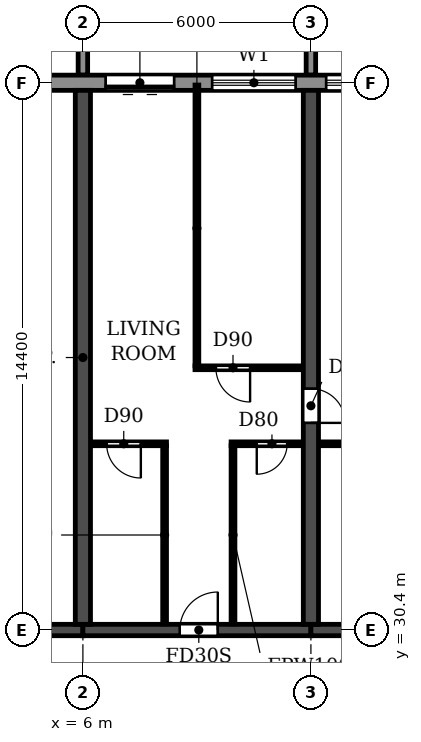
"""IFC4 building model, lengths in metres.
Left out: names, types, materials, properties, quantities, classifications, styles, units other than length and angle.
Written with IfcOpenShell. Run it as: python <this file> out.ifc"""

import sys

from ifc_helpers import new_model, si_unit, direction, frame, frame_2d, origin, place, context, subcontext, project, spatial, polyline, rectangle, outline, extrude, source, transform, mapped, element, fill, save


model = new_model("IFC4")
c1 = context("Model", 3, precision=1e-05, world=origin(), true_north=direction((0.0, 1.0)))
c2 = subcontext(c1, "Body", "Model", "MODEL_VIEW")
j1 = project(units=[si_unit("LENGTHUNIT", "METRE"), si_unit("PLANEANGLEUNIT", "RADIAN")], contexts=[c1])
p1 = place(None, origin())
s1 = spatial("IfcSite", under=j1, at=p1, CompositionType="ELEMENT")
p2 = place(p1, origin())
s2 = spatial("IfcBuilding", under=s1, at=p2, CompositionType="ELEMENT")
p3 = place(p2, frame((0.0, 0.0, 43.2)))
s3 = spatial("IfcBuildingStorey", under=s2, at=p3, CompositionType="ELEMENT", Elevation=43.2)
p4 = place(p3, frame((6.0, 30.55, 0.0), z_axis=(0.0, 0.0, 1.0), x_axis=(0.0, 1.0, 0.0)))
e1 = element("IfcWall", 1, at=p4, inside=s3, PredefinedType="SHEAR", context=c2, shape_type="SweptSolid", body=[
    extrude(rectangle(XDim=14.05, YDim=0.4, at=frame_2d((7.025, 0.0))), origin(), (0.0, 0.0, 1.0), 3.05),
])
p5 = place(p3, frame((12.0, 30.55, 0.0), z_axis=(0.0, 0.0, 1.0), x_axis=(0.0, 1.0, 0.0)))
e2 = element("IfcWall", 2, at=p5, inside=s3, PredefinedType="SHEAR", context=c2, shape_type="SweptSolid", body=[
    extrude(rectangle(XDim=14.05, YDim=0.4, at=frame_2d((7.025, 0.0))), origin(), (0.0, 0.0, 1.0), 3.05),
])
p6 = place(p5, frame((5.3, 0.0, 0.0)))
e3 = element("IfcOpeningElement", 3, at=p6, cuts=e2, PredefinedType="OPENING", context=c2, shape_type="SweptSolid", body=[
    extrude(rectangle(XDim=0.9, YDim=2.1, at=frame_2d((0.45, 1.05))), frame((0.0, 0.21, 0.0), z_axis=(0.0, -1.0, 0.0), x_axis=(1.0, 0.0, 0.0)), (0.0, 0.0, 1.0), 0.42),
])
p7 = place(p3, frame((0.2, 30.4, 0.0), z_axis=(0.0, 0.0, 1.0), x_axis=(1.0, 0.0, 0.0)))
e4 = element("IfcWall", 4, at=p7, inside=s3, PredefinedType="SHEAR", context=c2, shape_type="SweptSolid", body=[
    extrude(rectangle(XDim=5.8, YDim=0.3, at=frame_2d((2.9, 0.0))), origin(), (0.0, 0.0, 1.0), 2.45),
])
p8 = place(p7, frame((2.3, 0.0, 0.0)))
e5 = element("IfcOpeningElement", 5, at=p8, cuts=e4, PredefinedType="OPENING", context=c2, shape_type="SweptSolid", body=[
    extrude(rectangle(XDim=1.0, YDim=2.1, at=frame_2d((0.5, 1.05))), frame((0.0, 0.16, 0.0), z_axis=(0.0, -1.0, 0.0), x_axis=(1.0, 0.0, 0.0)), (0.0, 0.0, 1.0), 0.32),
])
p9 = place(p3, frame((6.0, 30.4, 0.0), z_axis=(0.0, 0.0, 1.0), x_axis=(1.0, 0.0, 0.0)))
e6 = element("IfcWall", 6, at=p9, inside=s3, PredefinedType="SHEAR", context=c2, shape_type="SweptSolid", body=[
    extrude(rectangle(XDim=6.0, YDim=0.3, at=frame_2d((3.0, 0.0))), origin(), (0.0, 0.0, 1.0), 2.45),
])
p10 = place(p9, frame((2.55, 0.0, 0.0)))
e7 = element("IfcOpeningElement", 7, at=p10, cuts=e6, PredefinedType="OPENING", context=c2, shape_type="SweptSolid", body=[
    extrude(rectangle(XDim=1.0, YDim=2.1, at=frame_2d((0.5, 1.05))), frame((0.0, 0.16, 0.0), z_axis=(0.0, -1.0, 0.0), x_axis=(1.0, 0.0, 0.0)), (0.0, 0.0, 1.0), 0.32),
])
p11 = place(p3, frame((12.0, 30.4, 0.0), z_axis=(0.0, 0.0, 1.0), x_axis=(1.0, 0.0, 0.0)))
e8 = element("IfcWall", 8, at=p11, inside=s3, PredefinedType="SHEAR", context=c2, shape_type="SweptSolid", body=[
    extrude(rectangle(XDim=6.0, YDim=0.3, at=frame_2d((3.0, 0.0))), origin(), (0.0, 0.0, 1.0), 2.45),
])
p12 = place(p3, frame((97.317, 44.8, 0.0), z_axis=(0.0, 0.0, 1.0), x_axis=(-1.0, 0.0, 0.0)))
e9 = element("IfcWall", 9, at=p12, inside=s3, PredefinedType="STANDARD", context=c2, shape_type="SweptSolid", body=[
    extrude(rectangle(XDim=92.634, YDim=0.4, at=frame_2d((46.317, 0.0))), origin(), (0.0, 0.0, 1.0), 3.05),
])
p13 = place(p12, frame((88.917, 0.0, 0.0)))
e10 = element("IfcOpeningElement", 10, at=p13, cuts=e9, PredefinedType="OPENING", context=c2, shape_type="SweptSolid", body=[
    extrude(rectangle(XDim=1.8, YDim=2.4, at=frame_2d((0.9, 1.2))), frame((0.0, 0.21, 0.0), z_axis=(0.0, -1.0, 0.0), x_axis=(1.0, 0.0, 0.0)), (0.0, 0.0, 1.0), 0.42),
])
p14 = place(p12, frame((85.717, 0.0, 0.9)))
e11 = element("IfcOpeningElement", 11, at=p14, cuts=e9, PredefinedType="OPENING", context=c2, shape_type="SweptSolid", body=[
    extrude(rectangle(XDim=2.2, YDim=1.5, at=frame_2d((1.1, 0.75))), frame((0.0, 0.21, 0.0), z_axis=(0.0, -1.0, 0.0), x_axis=(1.0, 0.0, 0.0)), (0.0, 0.0, 1.0), 0.42),
])
p15 = place(p12, frame((82.717, 0.0, 0.9)))
e12 = element("IfcOpeningElement", 12, at=p15, cuts=e9, PredefinedType="OPENING", context=c2, shape_type="SweptSolid", body=[
    extrude(rectangle(XDim=2.2, YDim=1.5, at=frame_2d((1.1, 0.75))), frame((0.0, 0.21, 0.0), z_axis=(0.0, -1.0, 0.0), x_axis=(1.0, 0.0, 0.0)), (0.0, 0.0, 1.0), 0.42),
])
p16 = place(p12, frame((79.717, 0.0, 0.9)))
e13 = element("IfcOpeningElement", 13, at=p16, cuts=e9, PredefinedType="OPENING", context=c2, shape_type="SweptSolid", body=[
    extrude(rectangle(XDim=2.2, YDim=1.5, at=frame_2d((1.1, 0.75))), frame((0.0, 0.21, 0.0), z_axis=(0.0, -1.0, 0.0), x_axis=(1.0, 0.0, 0.0)), (0.0, 0.0, 1.0), 0.42),
])
p17 = place(p12, frame((76.717, 0.0, 0.9)))
e14 = element("IfcOpeningElement", 14, at=p17, cuts=e9, PredefinedType="OPENING", context=c2, shape_type="SweptSolid", body=[
    extrude(rectangle(XDim=2.2, YDim=1.5, at=frame_2d((1.1, 0.75))), frame((0.0, 0.21, 0.0), z_axis=(0.0, -1.0, 0.0), x_axis=(1.0, 0.0, 0.0)), (0.0, 0.0, 1.0), 0.42),
])
p18 = place(p12, frame((73.917, 0.0, 0.0)))
e15 = element("IfcOpeningElement", 15, at=p18, cuts=e9, PredefinedType="OPENING", context=c2, shape_type="SweptSolid", body=[
    extrude(rectangle(XDim=1.8, YDim=2.4, at=frame_2d((0.9, 1.2))), frame((0.0, 0.21, 0.0), z_axis=(0.0, -1.0, 0.0), x_axis=(1.0, 0.0, 0.0)), (0.0, 0.0, 1.0), 0.42),
])
p19 = place(p12, frame((70.717, 0.0, 0.9)))
e16 = element("IfcOpeningElement", 16, at=p19, cuts=e9, PredefinedType="OPENING", context=c2, shape_type="SweptSolid", body=[
    extrude(rectangle(XDim=2.2, YDim=1.5, at=frame_2d((1.1, 0.75))), frame((0.0, 0.21, 0.0), z_axis=(0.0, -1.0, 0.0), x_axis=(1.0, 0.0, 0.0)), (0.0, 0.0, 1.0), 0.42),
])
p20 = place(p12, frame((67.717, 0.0, 0.9)))
e17 = element("IfcOpeningElement", 17, at=p20, cuts=e9, PredefinedType="OPENING", context=c2, shape_type="SweptSolid", body=[
    extrude(rectangle(XDim=2.2, YDim=1.5, at=frame_2d((1.1, 0.75))), frame((0.0, 0.21, 0.0), z_axis=(0.0, -1.0, 0.0), x_axis=(1.0, 0.0, 0.0)), (0.0, 0.0, 1.0), 0.42),
])
p21 = place(p12, frame((64.717, 0.0, 0.9)))
e18 = element("IfcOpeningElement", 18, at=p21, cuts=e9, PredefinedType="OPENING", context=c2, shape_type="SweptSolid", body=[
    extrude(rectangle(XDim=2.2, YDim=1.5, at=frame_2d((1.1, 0.75))), frame((0.0, 0.21, 0.0), z_axis=(0.0, -1.0, 0.0), x_axis=(1.0, 0.0, 0.0)), (0.0, 0.0, 1.0), 0.42),
])
p22 = place(p12, frame((61.917, 0.0, 0.0)))
e19 = element("IfcOpeningElement", 19, at=p22, cuts=e9, PredefinedType="OPENING", context=c2, shape_type="SweptSolid", body=[
    extrude(rectangle(XDim=1.8, YDim=2.4, at=frame_2d((0.9, 1.2))), frame((0.0, 0.21, 0.0), z_axis=(0.0, -1.0, 0.0), x_axis=(1.0, 0.0, 0.0)), (0.0, 0.0, 1.0), 0.42),
])
p23 = place(p12, frame((58.717, 0.0, 0.9)))
e20 = element("IfcOpeningElement", 20, at=p23, cuts=e9, PredefinedType="OPENING", context=c2, shape_type="SweptSolid", body=[
    extrude(rectangle(XDim=2.2, YDim=1.5, at=frame_2d((1.1, 0.75))), frame((0.0, 0.21, 0.0), z_axis=(0.0, -1.0, 0.0), x_axis=(1.0, 0.0, 0.0)), (0.0, 0.0, 1.0), 0.42),
])
p24 = place(p12, frame((55.717, 0.0, 0.9)))
e21 = element("IfcOpeningElement", 21, at=p24, cuts=e9, PredefinedType="OPENING", context=c2, shape_type="SweptSolid", body=[
    extrude(rectangle(XDim=2.2, YDim=1.5, at=frame_2d((1.1, 0.75))), frame((0.0, 0.21, 0.0), z_axis=(0.0, -1.0, 0.0), x_axis=(1.0, 0.0, 0.0)), (0.0, 0.0, 1.0), 0.42),
])
p25 = place(p12, frame((52.717, 0.0, 0.9)))
e22 = element("IfcOpeningElement", 22, at=p25, cuts=e9, PredefinedType="OPENING", context=c2, shape_type="SweptSolid", body=[
    extrude(rectangle(XDim=2.2, YDim=1.5, at=frame_2d((1.1, 0.75))), frame((0.0, 0.21, 0.0), z_axis=(0.0, -1.0, 0.0), x_axis=(1.0, 0.0, 0.0)), (0.0, 0.0, 1.0), 0.42),
])
p26 = place(p12, frame((49.917, 0.0, 0.0)))
e23 = element("IfcOpeningElement", 23, at=p26, cuts=e9, PredefinedType="OPENING", context=c2, shape_type="SweptSolid", body=[
    extrude(rectangle(XDim=1.8, YDim=2.4, at=frame_2d((0.9, 1.2))), frame((0.0, 0.21, 0.0), z_axis=(0.0, -1.0, 0.0), x_axis=(1.0, 0.0, 0.0)), (0.0, 0.0, 1.0), 0.42),
])
p27 = place(p12, frame((46.717, 0.0, 0.9)))
e24 = element("IfcOpeningElement", 24, at=p27, cuts=e9, PredefinedType="OPENING", context=c2, shape_type="SweptSolid", body=[
    extrude(rectangle(XDim=2.2, YDim=1.5, at=frame_2d((1.1, 0.75))), frame((0.0, 0.21, 0.0), z_axis=(0.0, -1.0, 0.0), x_axis=(1.0, 0.0, 0.0)), (0.0, 0.0, 1.0), 0.42),
])
p28 = place(p12, frame((43.717, 0.0, 0.9)))
e25 = element("IfcOpeningElement", 25, at=p28, cuts=e9, PredefinedType="OPENING", context=c2, shape_type="SweptSolid", body=[
    extrude(rectangle(XDim=2.2, YDim=1.5, at=frame_2d((1.1, 0.75))), frame((0.0, 0.21, 0.0), z_axis=(0.0, -1.0, 0.0), x_axis=(1.0, 0.0, 0.0)), (0.0, 0.0, 1.0), 0.42),
])
p29 = place(p12, frame((40.717, 0.0, 0.9)))
e26 = element("IfcOpeningElement", 26, at=p29, cuts=e9, PredefinedType="OPENING", context=c2, shape_type="SweptSolid", body=[
    extrude(rectangle(XDim=2.2, YDim=1.5, at=frame_2d((1.1, 0.75))), frame((0.0, 0.21, 0.0), z_axis=(0.0, -1.0, 0.0), x_axis=(1.0, 0.0, 0.0)), (0.0, 0.0, 1.0), 0.42),
])
p30 = place(p12, frame((37.917, 0.0, 0.0)))
e27 = element("IfcOpeningElement", 27, at=p30, cuts=e9, PredefinedType="OPENING", context=c2, shape_type="SweptSolid", body=[
    extrude(rectangle(XDim=1.8, YDim=2.4, at=frame_2d((0.9, 1.2))), frame((0.0, 0.21, 0.0), z_axis=(0.0, -1.0, 0.0), x_axis=(1.0, 0.0, 0.0)), (0.0, 0.0, 1.0), 0.42),
])
p31 = place(p12, frame((34.717, 0.0, 0.9)))
e28 = element("IfcOpeningElement", 28, at=p31, cuts=e9, PredefinedType="OPENING", context=c2, shape_type="SweptSolid", body=[
    extrude(rectangle(XDim=2.2, YDim=1.5, at=frame_2d((1.1, 0.75))), frame((0.0, 0.21, 0.0), z_axis=(0.0, -1.0, 0.0), x_axis=(1.0, 0.0, 0.0)), (0.0, 0.0, 1.0), 0.42),
])
p32 = place(p12, frame((31.717, 0.0, 0.9)))
e29 = element("IfcOpeningElement", 29, at=p32, cuts=e9, PredefinedType="OPENING", context=c2, shape_type="SweptSolid", body=[
    extrude(rectangle(XDim=2.2, YDim=1.5, at=frame_2d((1.1, 0.75))), frame((0.0, 0.21, 0.0), z_axis=(0.0, -1.0, 0.0), x_axis=(1.0, 0.0, 0.0)), (0.0, 0.0, 1.0), 0.42),
])
p33 = place(p12, frame((28.717, 0.0, 0.9)))
e30 = element("IfcOpeningElement", 30, at=p33, cuts=e9, PredefinedType="OPENING", context=c2, shape_type="SweptSolid", body=[
    extrude(rectangle(XDim=2.2, YDim=1.5, at=frame_2d((1.1, 0.75))), frame((0.0, 0.21, 0.0), z_axis=(0.0, -1.0, 0.0), x_axis=(1.0, 0.0, 0.0)), (0.0, 0.0, 1.0), 0.42),
])
p34 = place(p12, frame((25.917, 0.0, 0.0)))
e31 = element("IfcOpeningElement", 31, at=p34, cuts=e9, PredefinedType="OPENING", context=c2, shape_type="SweptSolid", body=[
    extrude(rectangle(XDim=1.8, YDim=2.4, at=frame_2d((0.9, 1.2))), frame((0.0, 0.21, 0.0), z_axis=(0.0, -1.0, 0.0), x_axis=(1.0, 0.0, 0.0)), (0.0, 0.0, 1.0), 0.42),
])
p35 = place(p12, frame((22.917, 0.0, 0.0)))
e32 = element("IfcOpeningElement", 32, at=p35, cuts=e9, PredefinedType="OPENING", context=c2, shape_type="SweptSolid", body=[
    extrude(rectangle(XDim=1.8, YDim=2.4, at=frame_2d((0.9, 1.2))), frame((0.0, 0.21, 0.0), z_axis=(0.0, -1.0, 0.0), x_axis=(1.0, 0.0, 0.0)), (0.0, 0.0, 1.0), 0.42),
])
p36 = place(p12, frame((19.717, 0.0, 0.9)))
e33 = element("IfcOpeningElement", 33, at=p36, cuts=e9, PredefinedType="OPENING", context=c2, shape_type="SweptSolid", body=[
    extrude(rectangle(XDim=2.2, YDim=1.5, at=frame_2d((1.1, 0.75))), frame((0.0, 0.21, 0.0), z_axis=(0.0, -1.0, 0.0), x_axis=(1.0, 0.0, 0.0)), (0.0, 0.0, 1.0), 0.42),
])
p37 = place(p12, frame((16.717, 0.0, 0.9)))
e34 = element("IfcOpeningElement", 34, at=p37, cuts=e9, PredefinedType="OPENING", context=c2, shape_type="SweptSolid", body=[
    extrude(rectangle(XDim=2.2, YDim=1.5, at=frame_2d((1.1, 0.75))), frame((0.0, 0.21, 0.0), z_axis=(0.0, -1.0, 0.0), x_axis=(1.0, 0.0, 0.0)), (0.0, 0.0, 1.0), 0.42),
])
p38 = place(p12, frame((13.717, 0.0, 0.9)))
e35 = element("IfcOpeningElement", 35, at=p38, cuts=e9, PredefinedType="OPENING", context=c2, shape_type="SweptSolid", body=[
    extrude(rectangle(XDim=2.2, YDim=1.5, at=frame_2d((1.1, 0.75))), frame((0.0, 0.21, 0.0), z_axis=(0.0, -1.0, 0.0), x_axis=(1.0, 0.0, 0.0)), (0.0, 0.0, 1.0), 0.42),
])
p39 = place(p12, frame((10.717, 0.0, 0.9)))
e36 = element("IfcOpeningElement", 36, at=p39, cuts=e9, PredefinedType="OPENING", context=c2, shape_type="SweptSolid", body=[
    extrude(rectangle(XDim=2.2, YDim=1.5, at=frame_2d((1.1, 0.75))), frame((0.0, 0.21, 0.0), z_axis=(0.0, -1.0, 0.0), x_axis=(1.0, 0.0, 0.0)), (0.0, 0.0, 1.0), 0.42),
])
p40 = place(p12, frame((7.917, 0.0, 0.0)))
e37 = element("IfcOpeningElement", 37, at=p40, cuts=e9, PredefinedType="OPENING", context=c2, shape_type="SweptSolid", body=[
    extrude(rectangle(XDim=1.8, YDim=2.4, at=frame_2d((0.9, 1.2))), frame((0.0, 0.21, 0.0), z_axis=(0.0, -1.0, 0.0), x_axis=(1.0, 0.0, 0.0)), (0.0, 0.0, 1.0), 0.42),
])
p41 = place(p12, frame((4.717, 0.0, 0.9)))
e38 = element("IfcOpeningElement", 38, at=p41, cuts=e9, PredefinedType="OPENING", context=c2, shape_type="SweptSolid", body=[
    extrude(rectangle(XDim=2.2, YDim=1.5, at=frame_2d((1.1, 0.75))), frame((0.0, 0.21, 0.0), z_axis=(0.0, -1.0, 0.0), x_axis=(1.0, 0.0, 0.0)), (0.0, 0.0, 1.0), 0.42),
])
p42 = place(p12, frame((1.917, 0.0, 0.0)))
e39 = element("IfcOpeningElement", 39, at=p42, cuts=e9, PredefinedType="OPENING", context=c2, shape_type="SweptSolid", body=[
    extrude(rectangle(XDim=1.8, YDim=2.4, at=frame_2d((0.9, 1.2))), frame((0.0, 0.21, 0.0), z_axis=(0.0, -1.0, 0.0), x_axis=(1.0, 0.0, 0.0)), (0.0, 0.0, 1.0), 0.42),
])
m1 = source(origin(), c2, "Body", "SweptSolid", [
    extrude(outline(polyline([(0.0, 0.0), (0.25, 0.0), (0.25, 3.1), (0.0, 3.1), (0.0, 0.0)])), origin(), (0.0, 0.0, 1.0), 3.1),
])
for number, where in (
    (40, (5.875, 45.0, 0.0)),
    (41, (11.875, 45.0, 0.0)),
):
    element("IfcWall", number, at=place(p3, frame(where)), inside=s3, PredefinedType="STANDARD", context=c2, shape_type="MappedRepresentation", body=[
        mapped(m1, transform((0.0, 0.0, 0.0))),
    ])
p43 = place(p3, frame((6.21, 35.3, 0.0), z_axis=(0.0, 0.0, 1.0), x_axis=(1.0, 0.0, 0.0)))
e42 = element("IfcWall", 42, at=p43, inside=s3, PredefinedType="PARTITIONING", context=c2, shape_type="SweptSolid", body=[
    extrude(rectangle(XDim=1.99, YDim=0.1, at=frame_2d((0.995, 0.0))), origin(), (0.0, 0.0, 1.0), 3.05),
])
p44 = place(p43, frame((0.415, 0.0, 0.0)))
e43 = element("IfcOpeningElement", 43, at=p44, cuts=e42, PredefinedType="OPENING", context=c2, shape_type="SweptSolid", body=[
    extrude(rectangle(XDim=0.9, YDim=2.1, at=frame_2d((0.45, 1.05))), frame((0.0, 0.06, 0.0), z_axis=(0.0, -1.0, 0.0), x_axis=(1.0, 0.0, 0.0)), (0.0, 0.0, 1.0), 0.12),
])
p45 = place(p3, frame((9.9, 35.3, 0.0), z_axis=(0.0, 0.0, 1.0), x_axis=(1.0, 0.0, 0.0)))
e44 = element("IfcWall", 44, at=p45, inside=s3, PredefinedType="PARTITIONING", context=c2, shape_type="SweptSolid", body=[
    extrude(rectangle(XDim=1.89, YDim=0.1, at=frame_2d((0.945, 0.0))), origin(), (0.0, 0.0, 1.0), 3.05),
])
p46 = place(p45, frame((0.675, 0.0, 0.0)))
e45 = element("IfcOpeningElement", 45, at=p46, cuts=e44, PredefinedType="OPENING", context=c2, shape_type="SweptSolid", body=[
    extrude(rectangle(XDim=0.8, YDim=2.1, at=frame_2d((0.4, 1.05))), frame((0.0, 0.06, 0.0), z_axis=(0.0, -1.0, 0.0), x_axis=(1.0, 0.0, 0.0)), (0.0, 0.0, 1.0), 0.12),
])
p47 = place(p3, frame((12.21, 35.3, 0.0), z_axis=(0.0, 0.0, 1.0), x_axis=(1.0, 0.0, 0.0)))
e46 = element("IfcWall", 46, at=p47, inside=s3, PredefinedType="PARTITIONING", context=c2, shape_type="SweptSolid", body=[
    extrude(rectangle(XDim=2.89, YDim=0.1, at=frame_2d((1.445, 0.0))), origin(), (0.0, 0.0, 1.0), 3.05),
])
p48 = place(p47, frame((0.89, 0.0, 0.0)))
e47 = element("IfcOpeningElement", 47, at=p48, cuts=e46, PredefinedType="OPENING", context=c2, shape_type="SweptSolid", body=[
    extrude(rectangle(XDim=0.8, YDim=2.1, at=frame_2d((0.4, 1.05))), frame((0.0, 0.06, 0.0), z_axis=(0.0, -1.0, 0.0), x_axis=(1.0, 0.0, 0.0)), (0.0, 0.0, 1.0), 0.12),
])
p49 = place(p3, frame((8.95, 37.3, 0.0), z_axis=(0.0, 0.0, 1.0), x_axis=(1.0, 0.0, 0.0)))
e48 = element("IfcWall", 48, at=p49, inside=s3, PredefinedType="PARTITIONING", context=c2, shape_type="SweptSolid", body=[
    extrude(rectangle(XDim=2.84, YDim=0.1, at=frame_2d((1.42, 0.0))), origin(), (0.0, 0.0, 1.0), 3.05),
])
p50 = place(p49, frame((0.55, 0.0, 0.0)))
e49 = element("IfcOpeningElement", 49, at=p50, cuts=e48, PredefinedType="OPENING", context=c2, shape_type="SweptSolid", body=[
    extrude(rectangle(XDim=0.9, YDim=2.1, at=frame_2d((0.45, 1.05))), frame((0.0, 0.06, 0.0), z_axis=(0.0, -1.0, 0.0), x_axis=(1.0, 0.0, 0.0)), (0.0, 0.0, 1.0), 0.12),
])
p51 = place(p3, frame((8.15, 30.56, 0.0), z_axis=(0.0, 0.0, 1.0), x_axis=(0.0, 1.0, 0.0)))
e50 = element("IfcWall", 50, at=p51, inside=s3, PredefinedType="PARTITIONING", context=c2, shape_type="SweptSolid", body=[
    extrude(rectangle(XDim=4.69, YDim=0.1, at=frame_2d((2.345, 0.0))), origin(), (0.0, 0.0, 1.0), 3.05),
])
p52 = place(p3, frame((9.0, 37.35, 0.0), z_axis=(0.0, 0.0, 1.0), x_axis=(0.0, 1.0, 0.0)))
e51 = element("IfcWall", 51, at=p52, inside=s3, PredefinedType="PARTITIONING", context=c2, shape_type="SweptSolid", body=[
    extrude(rectangle(XDim=7.39, YDim=0.1, at=frame_2d((3.695, 0.0))), origin(), (0.0, 0.0, 1.0), 3.05),
])
p53 = place(p3, frame((9.95, 30.56, 0.0), z_axis=(0.0, 0.0, 1.0), x_axis=(0.0, 1.0, 0.0)))
e52 = element("IfcWall", 52, at=p53, inside=s3, PredefinedType="PARTITIONING", context=c2, shape_type="SweptSolid", body=[
    extrude(rectangle(XDim=4.69, YDim=0.1, at=frame_2d((2.345, 0.0))), origin(), (0.0, 0.0, 1.0), 3.05),
])
p54 = place(p13, origin())
e53 = element("IfcDoor", 53, at=p54, inside=s3, OperationType="DOUBLE_DOOR_SLIDING", PredefinedType="DOOR", context=c2, shape_type="SweptSolid", body=[
    extrude(rectangle(XDim=1.8, YDim=2.4, at=frame_2d((0.9, 1.2))), frame((0.0, 0.025, 0.0), z_axis=(0.0, -1.0, 0.0), x_axis=(1.0, 0.0, 0.0)), (0.0, 0.0, 1.0), 0.05),
])
fill(e10, e53)
p55 = place(p14, origin())
e54 = element("IfcWindow", 54, at=p55, inside=s3, PartitioningType="DOUBLE_PANEL_HORIZONTAL", PredefinedType="WINDOW", context=c2, shape_type="SweptSolid", body=[
    extrude(rectangle(XDim=2.2, YDim=1.5, at=frame_2d((1.1, 0.75))), frame((0.0, 0.03, 0.0), z_axis=(0.0, -1.0, 0.0), x_axis=(1.0, 0.0, 0.0)), (0.0, 0.0, 1.0), 0.06),
])
fill(e11, e54)
p56 = place(p15, origin())
e55 = element("IfcWindow", 55, at=p56, inside=s3, PartitioningType="DOUBLE_PANEL_HORIZONTAL", PredefinedType="WINDOW", context=c2, shape_type="SweptSolid", body=[
    extrude(rectangle(XDim=2.2, YDim=1.5, at=frame_2d((1.1, 0.75))), frame((0.0, 0.03, 0.0), z_axis=(0.0, -1.0, 0.0), x_axis=(1.0, 0.0, 0.0)), (0.0, 0.0, 1.0), 0.06),
])
fill(e12, e55)
p57 = place(p44, frame((0.9, 0.0, 0.0), z_axis=(0.0, 0.0, 1.0), x_axis=(-1.0, 0.0, 0.0)))
e56 = element("IfcDoor", 56, at=p57, inside=s3, OperationType="SINGLE_SWING_LEFT", PredefinedType="DOOR", context=c2, shape_type="SweptSolid", body=[
    extrude(rectangle(XDim=0.9, YDim=2.1, at=frame_2d((0.45, 1.05))), frame((0.0, 0.025, 0.0), z_axis=(0.0, -1.0, 0.0), x_axis=(1.0, 0.0, 0.0)), (0.0, 0.0, 1.0), 0.05),
])
fill(e43, e56)
p58 = place(p10, origin())
e57 = element("IfcDoor", 57, at=p58, inside=s3, OperationType="SINGLE_SWING_RIGHT", PredefinedType="DOOR", context=c2, shape_type="SweptSolid", body=[
    extrude(rectangle(XDim=1.0, YDim=2.1, at=frame_2d((0.5, 1.05))), frame((0.0, 0.025, 0.0), z_axis=(0.0, -1.0, 0.0), x_axis=(1.0, 0.0, 0.0)), (0.0, 0.0, 1.0), 0.05),
])
fill(e7, e57)
p59 = place(p50, frame((0.9, 0.0, 0.0), z_axis=(0.0, 0.0, 1.0), x_axis=(-1.0, 0.0, 0.0)))
e58 = element("IfcDoor", 58, at=p59, inside=s3, OperationType="SINGLE_SWING_LEFT", PredefinedType="DOOR", context=c2, shape_type="SweptSolid", body=[
    extrude(rectangle(XDim=0.9, YDim=2.1, at=frame_2d((0.45, 1.05))), frame((0.0, 0.025, 0.0), z_axis=(0.0, -1.0, 0.0), x_axis=(1.0, 0.0, 0.0)), (0.0, 0.0, 1.0), 0.05),
])
fill(e49, e58)
p60 = place(p46, frame((0.8, 0.0, 0.0), z_axis=(0.0, 0.0, 1.0), x_axis=(-1.0, 0.0, 0.0)))
e59 = element("IfcDoor", 59, at=p60, inside=s3, OperationType="SINGLE_SWING_RIGHT", PredefinedType="DOOR", context=c2, shape_type="SweptSolid", body=[
    extrude(rectangle(XDim=0.8, YDim=2.1, at=frame_2d((0.4, 1.05))), frame((0.0, 0.025, 0.0), z_axis=(0.0, -1.0, 0.0), x_axis=(1.0, 0.0, 0.0)), (0.0, 0.0, 1.0), 0.05),
])
fill(e45, e59)
p61 = place(p6, frame((0.9, 0.0, 0.0), z_axis=(0.0, 0.0, 1.0), x_axis=(-1.0, 0.0, 0.0)))
e60 = element("IfcDoor", 60, at=p61, inside=s3, OperationType="SINGLE_SWING_RIGHT", PredefinedType="DOOR", context=c2, shape_type="SweptSolid", body=[
    extrude(rectangle(XDim=0.9, YDim=2.1, at=frame_2d((0.45, 1.05))), frame((0.0, 0.025, 0.0), z_axis=(0.0, -1.0, 0.0), x_axis=(1.0, 0.0, 0.0)), (0.0, 0.0, 1.0), 0.05),
])
fill(e3, e60)
save(model, sys.argv[1])
